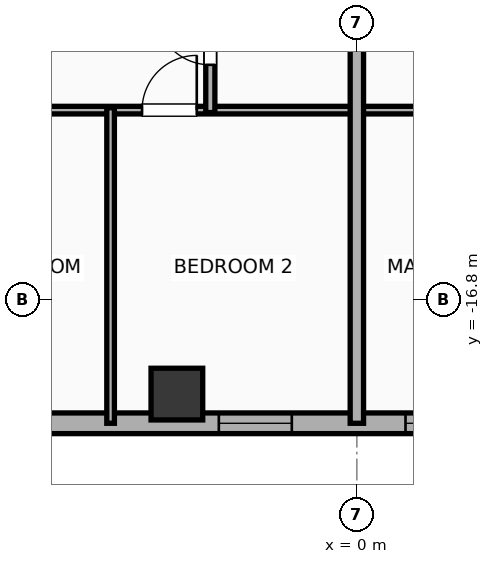
"""IFC4 building model, lengths in metres.
Left out: names, types, materials, properties, quantities, classifications, styles, units other than length and angle.
Written with IfcOpenShell. Run it as: python <this file> out.ifc"""

import sys

from ifc_helpers import new_model, si_unit, direction, frame, frame_2d, origin, origin_2d, place, context, subcontext, project, spatial, rectangle, hollow_rectangle, extrude, element, fill, save


model = new_model("IFC4")
c1 = context("Model", 3, precision=1e-05, world=origin(), true_north=direction((0.0, 1.0)))
c2 = subcontext(c1, "Body", "Model", "MODEL_VIEW")
j1 = project(units=[si_unit("LENGTHUNIT", "METRE"), si_unit("PLANEANGLEUNIT", "RADIAN")], contexts=[c1])
p1 = place(None, origin())
s1 = spatial("IfcSite", under=j1, at=p1, CompositionType="ELEMENT")
p2 = place(p1, origin())
s2 = spatial("IfcBuilding", under=s1, at=p2, CompositionType="ELEMENT")
p3 = place(p2, frame((0.0, 0.0, 250.9)))
s3 = spatial("IfcBuildingStorey", under=s2, at=p3, CompositionType="ELEMENT", Elevation=250.9)
p4 = place(p3, frame((-2.96, -18.35, 0.0), z_axis=(0.0, 0.0, 1.0), x_axis=(1.0, 0.0, 0.0)))
e1 = element("IfcColumn", 1, at=p4, inside=s3, PredefinedType="COLUMN", context=c2, shape_type="SweptSolid", body=[
    extrude(hollow_rectangle(XDim=0.85, YDim=0.85, WallThickness=0.028, at=origin_2d()), origin(), (0.0, 0.0, 1.0), 3.865),
])
p5 = place(p3, frame((26.783, -18.83, 0.0), z_axis=(0.0, 0.0, 1.0), x_axis=(-1.0, 0.0, 0.0)))
e2 = element("IfcWall", 2, at=p5, inside=s3, PredefinedType="ELEMENTEDWALL", context=c2, shape_type="SweptSolid", body=[
    extrude(rectangle(XDim=49.566, YDim=0.34, at=frame_2d((24.783, 0.0))), origin(), (0.0, 0.0, 1.0), 2.39),
])
p6 = place(p5, frame((23.583, 0.0, 0.75)))
e3 = element("IfcOpeningElement", 3, at=p6, cuts=e2, PredefinedType="OPENING", context=c2, shape_type="SweptSolid", body=[
    extrude(rectangle(XDim=2.4, YDim=1.45, at=frame_2d((1.2, 0.725))), frame((0.0, 0.18, 0.0), z_axis=(0.0, -1.0, 0.0), x_axis=(1.0, 0.0, 0.0)), (0.0, 0.0, 1.0), 0.36),
])
p7 = place(p5, frame((41.756, 0.0, 0.75)))
e4 = element("IfcOpeningElement", 4, at=p7, cuts=e2, PredefinedType="OPENING", context=c2, shape_type="SweptSolid", body=[
    extrude(rectangle(XDim=2.4, YDim=1.45, at=frame_2d((1.2, 0.725))), frame((0.0, 0.18, 0.0), z_axis=(0.0, -1.0, 0.0), x_axis=(1.0, 0.0, 0.0)), (0.0, 0.0, 1.0), 0.36),
])
p8 = place(p5, frame((47.222, 0.0, 0.55)))
e5 = element("IfcOpeningElement", 5, at=p8, cuts=e2, PredefinedType="OPENING", context=c2, shape_type="SweptSolid", body=[
    extrude(rectangle(XDim=1.2, YDim=1.15, at=frame_2d((0.6, 0.575))), frame((0.0, 0.18, 0.0), z_axis=(0.0, -1.0, 0.0), x_axis=(1.0, 0.0, 0.0)), (0.0, 0.0, 1.0), 0.36),
])
p9 = place(p5, frame((45.181, 0.0, 0.55)))
e6 = element("IfcOpeningElement", 6, at=p9, cuts=e2, PredefinedType="OPENING", context=c2, shape_type="SweptSolid", body=[
    extrude(rectangle(XDim=1.2, YDim=1.15, at=frame_2d((0.6, 0.575))), frame((0.0, 0.18, 0.0), z_axis=(0.0, -1.0, 0.0), x_axis=(1.0, 0.0, 0.0)), (0.0, 0.0, 1.0), 0.36),
])
p10 = place(p5, frame((37.289, 0.0, 0.55)))
e7 = element("IfcOpeningElement", 7, at=p10, cuts=e2, PredefinedType="OPENING", context=c2, shape_type="SweptSolid", body=[
    extrude(rectangle(XDim=1.2, YDim=1.15, at=frame_2d((0.6, 0.575))), frame((0.0, 0.18, 0.0), z_axis=(0.0, -1.0, 0.0), x_axis=(1.0, 0.0, 0.0)), (0.0, 0.0, 1.0), 0.36),
])
p11 = place(p5, frame((16.115, 0.0, 0.55)))
e8 = element("IfcOpeningElement", 8, at=p11, cuts=e2, PredefinedType="OPENING", context=c2, shape_type="SweptSolid", body=[
    extrude(rectangle(XDim=1.2, YDim=1.15, at=frame_2d((0.6, 0.575))), frame((0.0, 0.18, 0.0), z_axis=(0.0, -1.0, 0.0), x_axis=(1.0, 0.0, 0.0)), (0.0, 0.0, 1.0), 0.36),
])
p12 = place(p5, frame((12.422, 0.0, 0.55)))
e9 = element("IfcOpeningElement", 9, at=p12, cuts=e2, PredefinedType="OPENING", context=c2, shape_type="SweptSolid", body=[
    extrude(rectangle(XDim=1.2, YDim=1.15, at=frame_2d((0.6, 0.575))), frame((0.0, 0.18, 0.0), z_axis=(0.0, -1.0, 0.0), x_axis=(1.0, 0.0, 0.0)), (0.0, 0.0, 1.0), 0.36),
])
p13 = place(p5, frame((6.705, 0.0, 0.55)))
e10 = element("IfcOpeningElement", 10, at=p13, cuts=e2, PredefinedType="OPENING", context=c2, shape_type="SweptSolid", body=[
    extrude(rectangle(XDim=0.85, YDim=1.15, at=frame_2d((0.425, 0.575))), frame((0.0, 0.18, 0.0), z_axis=(0.0, -1.0, 0.0), x_axis=(1.0, 0.0, 0.0)), (0.0, 0.0, 1.0), 0.36),
])
p14 = place(p5, frame((4.637, 0.0, 0.55)))
e11 = element("IfcOpeningElement", 11, at=p14, cuts=e2, PredefinedType="OPENING", context=c2, shape_type="SweptSolid", body=[
    extrude(rectangle(XDim=1.2, YDim=1.15, at=frame_2d((0.6, 0.575))), frame((0.0, 0.18, 0.0), z_axis=(0.0, -1.0, 0.0), x_axis=(1.0, 0.0, 0.0)), (0.0, 0.0, 1.0), 0.36),
])
p15 = place(p5, frame((1.811, 0.0, 0.55)))
e12 = element("IfcOpeningElement", 12, at=p15, cuts=e2, PredefinedType="OPENING", context=c2, shape_type="SweptSolid", body=[
    extrude(rectangle(XDim=1.2, YDim=1.15, at=frame_2d((0.6, 0.575))), frame((0.0, 0.18, 0.0), z_axis=(0.0, -1.0, 0.0), x_axis=(1.0, 0.0, 0.0)), (0.0, 0.0, 1.0), 0.36),
])
p16 = place(p5, frame((32.253, 0.0, 0.55)))
e13 = element("IfcOpeningElement", 13, at=p16, cuts=e2, PredefinedType="OPENING", context=c2, shape_type="SweptSolid", body=[
    extrude(rectangle(XDim=1.2, YDim=1.15, at=frame_2d((0.6, 0.575))), frame((0.0, 0.18, 0.0), z_axis=(0.0, -1.0, 0.0), x_axis=(1.0, 0.0, 0.0)), (0.0, 0.0, 1.0), 0.36),
])
p17 = place(p5, frame((27.853, 0.0, 0.55)))
e14 = element("IfcOpeningElement", 14, at=p17, cuts=e2, PredefinedType="OPENING", context=c2, shape_type="SweptSolid", body=[
    extrude(rectangle(XDim=1.2, YDim=1.15, at=frame_2d((0.6, 0.575))), frame((0.0, 0.18, 0.0), z_axis=(0.0, -1.0, 0.0), x_axis=(1.0, 0.0, 0.0)), (0.0, 0.0, 1.0), 0.36),
])
p18 = place(p5, frame((20.473, 0.0, 0.55)))
e15 = element("IfcOpeningElement", 15, at=p18, cuts=e2, PredefinedType="OPENING", context=c2, shape_type="SweptSolid", body=[
    extrude(rectangle(XDim=1.2, YDim=1.15, at=frame_2d((0.6, 0.575))), frame((0.0, 0.18, 0.0), z_axis=(0.0, -1.0, 0.0), x_axis=(1.0, 0.0, 0.0)), (0.0, 0.0, 1.0), 0.36),
])
p19 = place(p3, frame((-8.08, -13.68, 0.0), z_axis=(0.0, 0.0, 1.0), x_axis=(1.0, 0.0, 0.0)))
e16 = element("IfcWall", 16, at=p19, inside=s3, PredefinedType="PARTITIONING", context=c2, shape_type="SweptSolid", body=[
    extrude(rectangle(XDim=8.06, YDim=0.125, at=frame_2d((4.03, 0.0))), origin(), (0.0, 0.0, 1.0), 3.5),
])
p20 = place(p19, frame((1.323, 0.0, 0.0)))
e17 = element("IfcOpeningElement", 17, at=p20, cuts=e16, PredefinedType="OPENING", context=c2, shape_type="SweptSolid", body=[
    extrude(rectangle(XDim=0.9, YDim=2.05, at=frame_2d((0.45, 1.025))), frame((0.0, 0.073, 0.0), z_axis=(0.0, -1.0, 0.0), x_axis=(1.0, 0.0, 0.0)), (0.0, 0.0, 1.0), 0.145),
])
p21 = place(p19, frame((4.547, 0.0, 0.0)))
e18 = element("IfcOpeningElement", 18, at=p21, cuts=e16, PredefinedType="OPENING", context=c2, shape_type="SweptSolid", body=[
    extrude(rectangle(XDim=0.9, YDim=2.05, at=frame_2d((0.45, 1.025))), frame((0.0, 0.073, 0.0), z_axis=(0.0, -1.0, 0.0), x_axis=(1.0, 0.0, 0.0)), (0.0, 0.0, 1.0), 0.145),
])
p22 = place(p3, frame((-2.41, -13.72, 0.0), z_axis=(0.0, 0.0, 1.0), x_axis=(0.0, 1.0, 0.0)))
e19 = element("IfcWall", 19, at=p22, inside=s3, PredefinedType="PLUMBINGWALL", context=c2, shape_type="SweptSolid", body=[
    extrude(rectangle(XDim=2.47, YDim=0.15, at=frame_2d((1.235, 0.0))), origin(), (0.0, 0.0, 1.0), 3.5),
])
p23 = place(p22, frame((0.785, 0.0, 0.0)))
e20 = element("IfcOpeningElement", 20, at=p23, cuts=e19, PredefinedType="OPENING", context=c2, shape_type="SweptSolid", body=[
    extrude(rectangle(XDim=0.9, YDim=2.05, at=frame_2d((0.45, 1.025))), frame((0.0, 0.085, 0.0), z_axis=(0.0, -1.0, 0.0), x_axis=(1.0, 0.0, 0.0)), (0.0, 0.0, 1.0), 0.17),
])
p24 = place(p3, frame((-4.05, -18.83, 0.0), z_axis=(0.0, 0.0, 1.0), x_axis=(0.0, 1.0, 0.0)))
e21 = element("IfcWall", 21, at=p24, inside=s3, PredefinedType="PARTITIONING", context=c2, shape_type="SweptSolid", body=[
    extrude(rectangle(XDim=5.19, YDim=0.125, at=frame_2d((2.595, 0.0))), origin(), (0.0, 0.0, 1.0), 2.39),
])
p25 = place(p3, frame((0.02, -13.68, 0.0), z_axis=(0.0, 0.0, 1.0), x_axis=(1.0, 0.0, 0.0)))
e22 = element("IfcWall", 22, at=p25, inside=s3, PredefinedType="PARTITIONING", context=c2, shape_type="SweptSolid", body=[
    extrude(rectangle(XDim=8.06, YDim=0.125, at=frame_2d((4.03, 0.0))), origin(), (0.0, 0.0, 1.0), 3.5),
])
p26 = place(p25, frame((1.323, 0.0, 0.0)))
e23 = element("IfcOpeningElement", 23, at=p26, cuts=e22, PredefinedType="OPENING", context=c2, shape_type="SweptSolid", body=[
    extrude(rectangle(XDim=0.9, YDim=2.05, at=frame_2d((0.45, 1.025))), frame((0.0, 0.073, 0.0), z_axis=(0.0, -1.0, 0.0), x_axis=(1.0, 0.0, 0.0)), (0.0, 0.0, 1.0), 0.145),
])
p27 = place(p25, frame((5.837, 0.0, 0.0)))
e24 = element("IfcOpeningElement", 24, at=p27, cuts=e22, PredefinedType="OPENING", context=c2, shape_type="SweptSolid", body=[
    extrude(rectangle(XDim=0.9, YDim=2.05, at=frame_2d((0.45, 1.025))), frame((0.0, 0.073, 0.0), z_axis=(0.0, -1.0, 0.0), x_axis=(1.0, 0.0, 0.0)), (0.0, 0.0, 1.0), 0.145),
])
p28 = place(p3, frame((0.0, -18.83, 0.0), z_axis=(0.0, 0.0, 1.0), x_axis=(0.0, 1.0, 0.0)))
e25 = element("IfcWall", 25, at=p28, inside=s3, PredefinedType="PARTITIONING", context=c2, shape_type="SweptSolid", body=[
    extrude(rectangle(XDim=9.99, YDim=0.22, at=frame_2d((4.995, 0.0))), origin(), (0.0, 0.0, 1.0), 2.39),
])
p29 = place(p6, origin())
e26 = element("IfcWindow", 26, at=p29, inside=s3, PartitioningType="SINGLE_PANEL", PredefinedType="WINDOW", context=c2, shape_type="SweptSolid", body=[
    extrude(rectangle(XDim=2.4, YDim=1.45, at=frame_2d((1.2, 0.725))), frame((0.0, 0.03, 0.0), z_axis=(0.0, -1.0, 0.0), x_axis=(1.0, 0.0, 0.0)), (0.0, 0.0, 1.0), 0.06),
])
fill(e3, e26)
p30 = place(p17, origin())
e27 = element("IfcWindow", 27, at=p30, inside=s3, PartitioningType="SINGLE_PANEL", PredefinedType="WINDOW", context=c2, shape_type="SweptSolid", body=[
    extrude(rectangle(XDim=1.2, YDim=1.15, at=frame_2d((0.6, 0.575))), frame((0.0, 0.03, 0.0), z_axis=(0.0, -1.0, 0.0), x_axis=(1.0, 0.0, 0.0)), (0.0, 0.0, 1.0), 0.06),
])
fill(e14, e27)
p31 = place(p21, origin())
e28 = element("IfcDoor", 28, at=p31, inside=s3, OperationType="SINGLE_SWING_RIGHT", PredefinedType="DOOR", context=c2, shape_type="SweptSolid", body=[
    extrude(rectangle(XDim=0.9, YDim=2.05, at=frame_2d((0.45, 1.025))), frame((0.0, 0.025, 0.0), z_axis=(0.0, -1.0, 0.0), x_axis=(1.0, 0.0, 0.0)), (0.0, 0.0, 1.0), 0.05),
])
fill(e18, e28)
p32 = place(p23, origin())
e29 = element("IfcDoor", 29, at=p32, inside=s3, OperationType="SINGLE_SWING_RIGHT", PredefinedType="DOOR", context=c2, shape_type="SweptSolid", body=[
    extrude(rectangle(XDim=0.9, YDim=2.05, at=frame_2d((0.45, 1.025))), frame((0.0, 0.025, 0.0), z_axis=(0.0, -1.0, 0.0), x_axis=(1.0, 0.0, 0.0)), (0.0, 0.0, 1.0), 0.05),
])
fill(e20, e29)
save(model, sys.argv[1])
